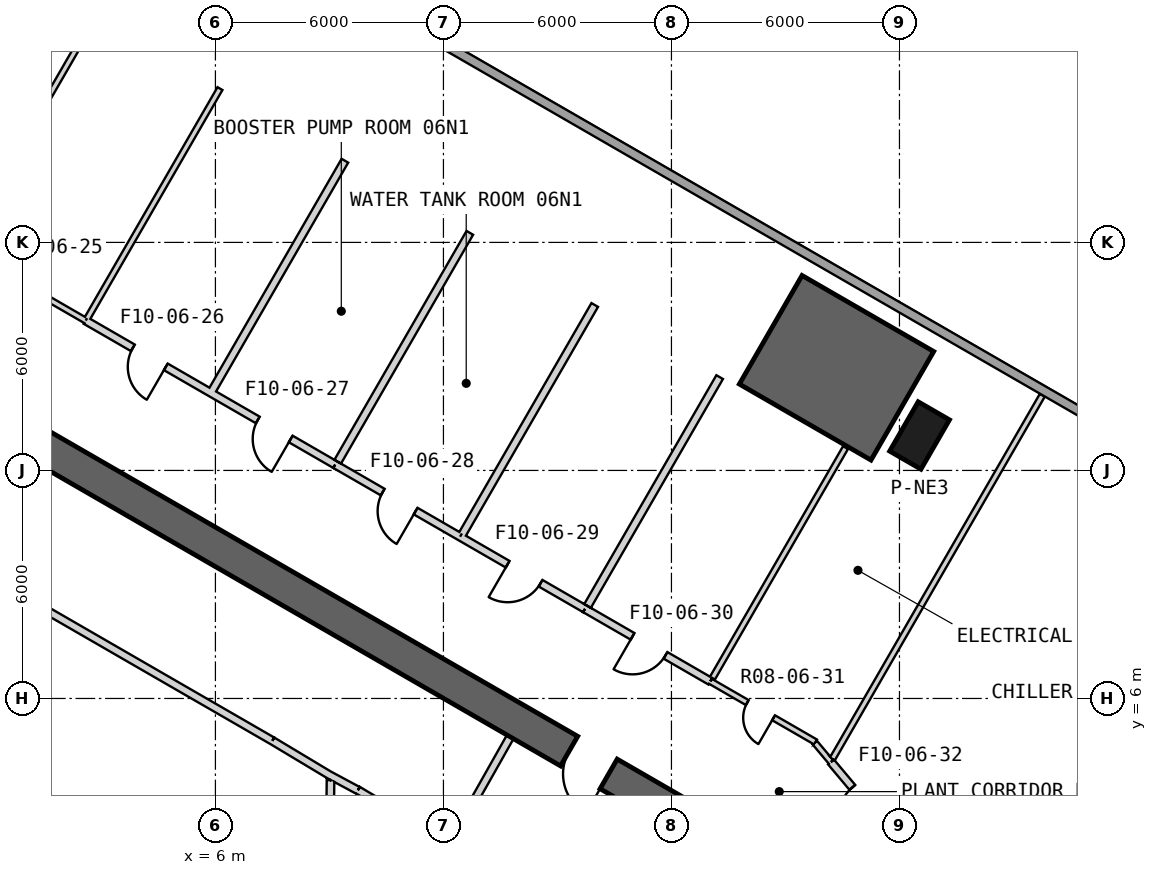
"""IFC4 building model, lengths in metres.
Left out: names, types, materials, properties, quantities, classifications, styles, units other than length and angle.
Written with IfcOpenShell. Run it as: python <this file> out.ifc"""

import sys

from ifc_helpers import new_model, si_unit, direction, frame, frame_2d, origin, origin_2d, place, context, subcontext, project, spatial, polyline, rectangle, outline, extrude, element, fill, save


model = new_model("IFC4")
c1 = context("Model", 3, precision=1e-05, world=origin(), true_north=direction((0.0, 1.0)))
c2 = subcontext(c1, "Body", "Model", "MODEL_VIEW")
j1 = project(units=[si_unit("LENGTHUNIT", "METRE"), si_unit("PLANEANGLEUNIT", "RADIAN")], contexts=[c1])
p1 = place(None, origin())
s1 = spatial("IfcSite", under=j1, at=p1, CompositionType="ELEMENT")
p2 = place(p1, origin())
s2 = spatial("IfcBuilding", under=s1, at=p2, CompositionType="ELEMENT")
p3 = place(p2, frame((0.0, 0.0, 39.5)))
s3 = spatial("IfcBuildingStorey", under=s2, at=p3, CompositionType="ELEMENT", Elevation=39.5)
p4 = place(p3, frame((24.529, 12.92, 0.0), z_axis=(0.0, 0.0, 1.0), x_axis=(0.5, 0.866025403784, 0.0)))
e1 = element("IfcColumn", 1, at=p4, inside=s3, PredefinedType="COLUMN", context=c2, shape_type="SweptSolid", body=[
    extrude(rectangle(XDim=1.5, YDim=0.95, at=origin_2d()), origin(), (0.0, 0.0, 1.0), 5.7),
])
p5 = place(p3, frame((19.475, 2.208, 0.0), z_axis=(0.0, 0.0, 1.0), x_axis=(-0.866028369851, 0.499994862586, 0.0)))
e2 = element("IfcWall", 2, at=p5, inside=s3, PredefinedType="SHEAR", context=c2, shape_type="SweptSolid", body=[
    extrude(rectangle(XDim=31.523, YDim=0.9, at=frame_2d((15.762, 0.0))), origin(), (0.0, 0.0, 1.0), 6.0),
])
p6 = place(p5, frame((3.612, 0.0, 0.0)))
e3 = element("IfcOpeningElement", 3, at=p6, cuts=e2, PredefinedType="OPENING", context=c2, shape_type="SweptSolid", body=[
    extrude(rectangle(XDim=1.2, YDim=2.4, at=frame_2d((0.6, 1.2))), frame((0.0, 0.46, 0.0), z_axis=(0.0, -1.0, 0.0), x_axis=(1.0, 0.0, 0.0)), (0.0, 0.0, 1.0), 0.92),
])
p7 = place(p5, frame((26.712, 0.0, 0.0)))
e4 = element("IfcOpeningElement", 4, at=p7, cuts=e2, PredefinedType="OPENING", context=c2, shape_type="SweptSolid", body=[
    extrude(rectangle(XDim=1.2, YDim=2.4, at=frame_2d((0.6, 1.2))), frame((0.0, 0.46, 0.0), z_axis=(0.0, -1.0, 0.0), x_axis=(1.0, 0.0, 0.0)), (0.0, 0.0, 1.0), 0.92),
])
p8 = place(p3, origin())
e5 = element("IfcWall", 5, at=p8, inside=s3, PredefinedType="SHEAR", context=c2, shape_type="SweptSolid", body=[
    extrude(outline(polyline([(24.901, 15.13), (21.437, 17.13), (19.787, 14.272), (23.251, 12.272), (24.901, 15.13)])), origin(), (0.0, 0.0, 1.0), 5.7),
])
p9 = place(p3, frame((30.969, 12.269, 0.0), z_axis=(0.0, 0.0, 1.0), x_axis=(-0.866060590604, 0.499939049688, 0.0)))
e6 = element("IfcWall", 6, at=p9, inside=s3, PredefinedType="SOLIDWALL", context=c2, shape_type="SweptSolid", body=[
    extrude(rectangle(XDim=41.371, YDim=0.24, at=frame_2d((20.686, 0.0))), origin(), (0.0, 0.0, 1.0), 5.7),
])
p10 = place(p3, frame((7.497, 4.886, 0.0), z_axis=(0.0, 0.0, 1.0), x_axis=(-0.866030989016, 0.499990325971, 0.0)))
e7 = element("IfcWall", 7, at=p10, inside=s3, PredefinedType="PLUMBINGWALL", context=c2, shape_type="SweptSolid", body=[
    extrude(rectangle(XDim=8.1, YDim=0.2, at=frame_2d((4.05, 0.0))), origin(), (0.0, 0.0, 1.0), 5.7),
])
p11 = place(p3, frame((12.11, 2.073, 0.0), z_axis=(0.0, 0.0, 1.0), x_axis=(0.49196600604, 0.870614408852, 0.0)))
e8 = element("IfcWall", 8, at=p11, inside=s3, PredefinedType="PLUMBINGWALL", context=c2, shape_type="SweptSolid", body=[
    extrude(rectangle(XDim=3.35, YDim=0.2, at=frame_2d((1.675, 0.0))), origin(), (0.0, 0.0, 1.0), 5.7),
])
p12 = place(p3, frame((12.073, 2.211, 0.0), z_axis=(0.0, 0.0, 1.0), x_axis=(-0.860438357912, 0.509554542943, 0.0)))
e9 = element("IfcWall", 9, at=p12, inside=s3, PredefinedType="PLUMBINGWALL", context=c2, shape_type="SweptSolid", body=[
    extrude(rectangle(XDim=2.7, YDim=0.2, at=frame_2d((1.35, 0.0))), origin(), (0.0, 0.0, 1.0), 5.7),
])
p13 = place(p3, frame((9.748, 3.583, 0.0), z_axis=(0.0, 0.0, 1.0), x_axis=(-0.880917147855, 0.473270513147, 0.0)))
e10 = element("IfcWall", 10, at=p13, inside=s3, PredefinedType="PLUMBINGWALL", context=c2, shape_type="SweptSolid", body=[
    extrude(rectangle(XDim=0.878, YDim=0.2, at=frame_2d((0.439, 0.0))), origin(), (0.0, 0.0, 1.0), 5.7),
])
p14 = place(p3, frame((9.079, 3.937, 0.0), z_axis=(0.0, 0.0, 1.0), x_axis=(-0.857516281273, 0.51445682749, 0.0)))
e11 = element("IfcWall", 11, at=p14, inside=s3, PredefinedType="PLUMBINGWALL", context=c2, shape_type="SweptSolid", body=[
    extrude(rectangle(XDim=1.845, YDim=0.2, at=frame_2d((0.922, 0.0))), origin(), (0.0, 0.0, 1.0), 5.7),
])
p15 = place(p3, frame((9.001, 1.27, 0.0), z_axis=(0.0, 0.0, 1.0), x_axis=(0.010784614026, 0.999941844359, 0.0)))
e12 = element("IfcWall", 12, at=p15, inside=s3, PredefinedType="PARTITIONING", context=c2, shape_type="SweptSolid", body=[
    extrude(rectangle(XDim=2.581, YDim=0.2, at=frame_2d((1.291, 0.0))), origin(), (0.0, 0.0, 1.0), 5.7),
])
p16 = place(p3, frame((19.023, 6.453, 0.0), z_axis=(0.0, 0.0, 1.0), x_axis=(-0.866009436129, 0.500027655771, 0.0)))
e13 = element("IfcWall", 13, at=p16, inside=s3, PredefinedType="PARTITIONING", context=c2, shape_type="SweptSolid", body=[
    extrude(rectangle(XDim=3.808, YDim=0.2, at=frame_2d((1.904, 0.0))), origin(), (0.0, 0.0, 1.0), 4.88),
])
p17 = place(p16, frame((1.363, 0.0, 0.0)))
e14 = element("IfcOpeningElement", 14, at=p17, cuts=e13, PredefinedType="OPENING", context=c2, shape_type="SweptSolid", body=[
    extrude(rectangle(XDim=1.0, YDim=2.1, at=frame_2d((0.5, 1.05))), frame((0.0, 0.11, 0.0), z_axis=(0.0, -1.0, 0.0), x_axis=(1.0, 0.0, 0.0)), (0.0, 0.0, 1.0), 0.22),
])
p18 = place(p3, frame((15.725, 8.357, 0.0), z_axis=(0.0, 0.0, 1.0), x_axis=(-0.866037770685, 0.499978579288, 0.0)))
e15 = element("IfcWall", 15, at=p18, inside=s3, PredefinedType="PARTITIONING", context=c2, shape_type="SweptSolid", body=[
    extrude(rectangle(XDim=3.796, YDim=0.2, at=frame_2d((1.898, 0.0))), origin(), (0.0, 0.0, 1.0), 4.88),
])
p19 = place(p18, frame((1.35, 0.0, 0.0)))
e16 = element("IfcOpeningElement", 16, at=p19, cuts=e15, PredefinedType="OPENING", context=c2, shape_type="SweptSolid", body=[
    extrude(rectangle(XDim=1.0, YDim=2.1, at=frame_2d((0.5, 1.05))), frame((0.0, 0.11, 0.0), z_axis=(0.0, -1.0, 0.0), x_axis=(1.0, 0.0, 0.0)), (0.0, 0.0, 1.0), 0.22),
])
p20 = place(p3, frame((12.438, 10.255, 0.0), z_axis=(0.0, 0.0, 1.0), x_axis=(-0.866009918585, 0.500026820193, 0.0)))
e17 = element("IfcWall", 17, at=p20, inside=s3, PredefinedType="PARTITIONING", context=c2, shape_type="SweptSolid", body=[
    extrude(rectangle(XDim=3.796, YDim=0.2, at=frame_2d((1.898, 0.0))), origin(), (0.0, 0.0, 1.0), 4.98),
])
p21 = place(p20, frame((1.35, 0.0, 0.0)))
e18 = element("IfcOpeningElement", 18, at=p21, cuts=e17, PredefinedType="OPENING", context=c2, shape_type="SweptSolid", body=[
    extrude(rectangle(XDim=1.0, YDim=2.1, at=frame_2d((0.5, 1.05))), frame((0.0, 0.11, 0.0), z_axis=(0.0, -1.0, 0.0), x_axis=(1.0, 0.0, 0.0)), (0.0, 0.0, 1.0), 0.22),
])
p22 = place(p3, frame((9.15, 12.153, 0.0), z_axis=(0.0, 0.0, 1.0), x_axis=(-0.866026268399, 0.49999850244, 0.0)))
e19 = element("IfcWall", 19, at=p22, inside=s3, PredefinedType="PARTITIONING", context=c2, shape_type="SweptSolid", body=[
    extrude(rectangle(XDim=7.579, YDim=0.2, at=frame_2d((3.79, 0.0))), origin(), (0.0, 0.0, 1.0), 4.98),
])
p23 = place(p22, frame((5.146, 0.0, 0.0)))
e20 = element("IfcOpeningElement", 20, at=p23, cuts=e19, PredefinedType="OPENING", context=c2, shape_type="SweptSolid", body=[
    extrude(rectangle(XDim=1.0, YDim=2.1, at=frame_2d((0.5, 1.05))), frame((0.0, 0.11, 0.0), z_axis=(0.0, -1.0, 0.0), x_axis=(1.0, 0.0, 0.0)), (0.0, 0.0, 1.0), 0.22),
])
p24 = place(p22, frame((1.35, 0.0, 0.0)))
e21 = element("IfcOpeningElement", 21, at=p24, cuts=e19, PredefinedType="OPENING", context=c2, shape_type="SweptSolid", body=[
    extrude(rectangle(XDim=1.0, YDim=2.1, at=frame_2d((0.5, 1.05))), frame((0.0, 0.11, 0.0), z_axis=(0.0, -1.0, 0.0), x_axis=(1.0, 0.0, 0.0)), (0.0, 0.0, 1.0), 0.22),
])
p25 = place(p3, frame((21.792, 4.854, 0.0), z_axis=(0.0, 0.0, 1.0), x_axis=(-0.86603554589, 0.499982432947, 0.0)))
e22 = element("IfcWall", 22, at=p25, inside=s3, PredefinedType="PLUMBINGWALL", context=c2, shape_type="SweptSolid", body=[
    extrude(rectangle(XDim=3.197, YDim=0.15, at=frame_2d((1.599, 0.0))), origin(), (0.0, 0.0, 1.0), 4.88),
])
p26 = place(p25, frame((1.275, 0.0, 0.0)))
e23 = element("IfcOpeningElement", 23, at=p26, cuts=e22, PredefinedType="OPENING", context=c2, shape_type="SweptSolid", body=[
    extrude(rectangle(XDim=0.8, YDim=2.1, at=frame_2d((0.4, 1.05))), frame((0.0, 0.085, 0.0), z_axis=(0.0, -1.0, 0.0), x_axis=(1.0, 0.0, 0.0)), (0.0, 0.0, 1.0), 0.17),
])
p27 = place(p3, frame((2.587, 15.943, 0.0), z_axis=(0.0, 0.0, 1.0), x_axis=(-0.866037770685, 0.499978579288, 0.0)))
e24 = element("IfcWall", 24, at=p27, inside=s3, PredefinedType="PLUMBINGWALL", context=c2, shape_type="SweptSolid", body=[
    extrude(rectangle(XDim=3.796, YDim=0.15, at=frame_2d((1.898, 0.0))), origin(), (0.0, 0.0, 1.0), 4.88),
])
p28 = place(p27, frame((1.363, 0.0, 0.0)))
e25 = element("IfcOpeningElement", 25, at=p28, cuts=e24, PredefinedType="OPENING", context=c2, shape_type="SweptSolid", body=[
    extrude(rectangle(XDim=0.8, YDim=2.1, at=frame_2d((0.4, 1.05))), frame((0.0, 0.085, 0.0), z_axis=(0.0, -1.0, 0.0), x_axis=(1.0, 0.0, 0.0)), (0.0, 0.0, 1.0), 0.17),
])
p29 = place(p3, frame((22.198, 4.33, 0.0), z_axis=(0.0, 0.0, 1.0), x_axis=(-0.642696485047, 0.766120896535, 0.0)))
e26 = element("IfcWall", 26, at=p29, inside=s3, PredefinedType="PLUMBINGWALL", context=c2, shape_type="SweptSolid", body=[
    extrude(rectangle(XDim=0.659, YDim=0.15, at=frame_2d((0.329, 0.0))), origin(), (0.0, 0.0, 1.0), 5.7),
])
p30 = place(p3, frame((24.07, 2.099, 0.0), z_axis=(0.0, 0.0, 1.0), x_axis=(-0.642786909483, 0.766045030659, 0.0)))
e27 = element("IfcWall", 27, at=p30, inside=s3, PredefinedType="PARTITIONING", context=c2, shape_type="SweptSolid", body=[
    extrude(rectangle(XDim=2.912, YDim=0.2, at=frame_2d((1.456, 0.0))), origin(), (0.0, 0.0, 1.0), 4.78),
])
p31 = place(p30, frame((1.037, 0.0, 0.0)))
e28 = element("IfcOpeningElement", 28, at=p31, cuts=e27, PredefinedType="OPENING", context=c2, shape_type="SweptSolid", body=[
    extrude(rectangle(XDim=1.0, YDim=2.1, at=frame_2d((0.5, 1.05))), frame((0.0, 0.11, 0.0), z_axis=(0.0, -1.0, 0.0), x_axis=(1.0, 0.0, 0.0)), (0.0, 0.0, 1.0), 0.22),
])
p32 = place(p3, frame((-0.644, 17.923, 0.0), z_axis=(0.0, 0.0, 1.0), x_axis=(0.500017264306, 0.866015436003, 0.0)))
e29 = element("IfcWall", 29, at=p32, inside=s3, PredefinedType="PLUMBINGWALL", context=c2, shape_type="SweptSolid", body=[
    extrude(rectangle(XDim=6.953, YDim=0.15, at=frame_2d((3.477, 0.0))), origin(), (0.0, 0.0, 1.0), 4.88),
])
p33 = place(p3, frame((2.631, 16.004, 0.0), z_axis=(0.0, 0.0, 1.0), x_axis=(0.500007122158, 0.866021291765, 0.0)))
e30 = element("IfcWall", 30, at=p33, inside=s3, PredefinedType="PLUMBINGWALL", context=c2, shape_type="SweptSolid", body=[
    extrude(rectangle(XDim=6.979, YDim=0.15, at=frame_2d((3.489, 0.0))), origin(), (0.0, 0.0, 1.0), 4.98),
])
p34 = place(p3, frame((9.407, 20.149, 0.0), z_axis=(0.0, 0.0, 1.0), x_axis=(-0.500002060787, -0.866024213985, 0.0)))
e31 = element("IfcWall", 31, at=p34, inside=s3, PredefinedType="PARTITIONING", context=c2, shape_type="SweptSolid", body=[
    extrude(rectangle(XDim=6.954, YDim=0.2, at=frame_2d((3.477, 0.0))), origin(), (0.0, 0.0, 1.0), 5.7),
])
p35 = place(p3, frame((9.218, 12.23, 0.0), z_axis=(0.0, 0.0, 1.0), x_axis=(0.500017264306, 0.866015436003, 0.0)))
e32 = element("IfcWall", 32, at=p35, inside=s3, PredefinedType="PARTITIONING", context=c2, shape_type="SweptSolid", body=[
    extrude(rectangle(XDim=6.953, YDim=0.2, at=frame_2d((3.477, 0.0))), origin(), (0.0, 0.0, 1.0), 5.7),
])
p36 = place(p3, frame((15.981, 16.354, 0.0), z_axis=(0.0, 0.0, 1.0), x_axis=(-0.499990930889, -0.866030639775, 0.0)))
e33 = element("IfcWall", 33, at=p36, inside=s3, PredefinedType="PARTITIONING", context=c2, shape_type="SweptSolid", body=[
    extrude(rectangle(XDim=6.953, YDim=0.2, at=frame_2d((3.477, 0.0))), origin(), (0.0, 0.0, 1.0), 4.98),
])
p37 = place(p3, frame((19.269, 14.456, 0.0), z_axis=(0.0, 0.0, 1.0), x_axis=(-0.500002060787, -0.866024213985, 0.0)))
e34 = element("IfcWall", 34, at=p37, inside=s3, PredefinedType="PARTITIONING", context=c2, shape_type="SweptSolid", body=[
    extrude(rectangle(XDim=6.954, YDim=0.2, at=frame_2d((3.477, 0.0))), origin(), (0.0, 0.0, 1.0), 4.88),
])
p38 = place(p3, frame((22.581, 12.601, 0.0), z_axis=(0.0, 0.0, 1.0), x_axis=(-0.500012147621, -0.866018390239, 0.0)))
e35 = element("IfcWall", 35, at=p38, inside=s3, PredefinedType="PLUMBINGWALL", context=c2, shape_type="SweptSolid", body=[
    extrude(rectangle(XDim=7.003, YDim=0.15, at=frame_2d((3.501, 0.0))), origin(), (0.0, 0.0, 1.0), 4.88),
])
p39 = place(p3, frame((27.759, 13.978, 0.0), z_axis=(0.0, 0.0, 1.0), x_axis=(-0.500006715255, -0.866021526696, 0.0)))
e36 = element("IfcWall", 36, at=p39, inside=s3, PredefinedType="PLUMBINGWALL", context=c2, shape_type="SweptSolid", body=[
    extrude(rectangle(XDim=11.052, YDim=0.15, at=frame_2d((5.526, 0.0))), origin(), (0.0, 0.0, 1.0), 4.88),
])
p40 = place(p23, origin())
e37 = element("IfcDoor", 37, at=p40, inside=s3, OperationType="SINGLE_SWING_LEFT", PredefinedType="USERDEFINED", context=c2, shape_type="SweptSolid", body=[
    extrude(rectangle(XDim=1.0, YDim=2.1, at=frame_2d((0.5, 1.05))), frame((0.0, 0.025, 0.0), z_axis=(0.0, -1.0, 0.0), x_axis=(1.0, 0.0, 0.0)), (0.0, 0.0, 1.0), 0.05),
])
fill(e20, e37)
p41 = place(p24, origin())
e38 = element("IfcDoor", 38, at=p41, inside=s3, OperationType="SINGLE_SWING_LEFT", PredefinedType="USERDEFINED", context=c2, shape_type="SweptSolid", body=[
    extrude(rectangle(XDim=1.0, YDim=2.1, at=frame_2d((0.5, 1.05))), frame((0.0, 0.025, 0.0), z_axis=(0.0, -1.0, 0.0), x_axis=(1.0, 0.0, 0.0)), (0.0, 0.0, 1.0), 0.05),
])
fill(e21, e38)
p42 = place(p21, origin())
e39 = element("IfcDoor", 39, at=p42, inside=s3, OperationType="SINGLE_SWING_LEFT", PredefinedType="USERDEFINED", context=c2, shape_type="SweptSolid", body=[
    extrude(rectangle(XDim=1.0, YDim=2.1, at=frame_2d((0.5, 1.05))), frame((0.0, 0.025, 0.0), z_axis=(0.0, -1.0, 0.0), x_axis=(1.0, 0.0, 0.0)), (0.0, 0.0, 1.0), 0.05),
])
fill(e18, e39)
p43 = place(p19, origin())
e40 = element("IfcDoor", 40, at=p43, inside=s3, OperationType="SINGLE_SWING_RIGHT", PredefinedType="USERDEFINED", context=c2, shape_type="SweptSolid", body=[
    extrude(rectangle(XDim=1.0, YDim=2.1, at=frame_2d((0.5, 1.05))), frame((0.0, 0.025, 0.0), z_axis=(0.0, -1.0, 0.0), x_axis=(1.0, 0.0, 0.0)), (0.0, 0.0, 1.0), 0.05),
])
fill(e16, e40)
p44 = place(p17, origin())
e41 = element("IfcDoor", 41, at=p44, inside=s3, OperationType="SINGLE_SWING_RIGHT", PredefinedType="USERDEFINED", context=c2, shape_type="SweptSolid", body=[
    extrude(rectangle(XDim=1.0, YDim=2.1, at=frame_2d((0.5, 1.05))), frame((0.0, 0.025, 0.0), z_axis=(0.0, -1.0, 0.0), x_axis=(1.0, 0.0, 0.0)), (0.0, 0.0, 1.0), 0.05),
])
fill(e14, e41)
p45 = place(p26, origin())
e42 = element("IfcDoor", 42, at=p45, inside=s3, OperationType="SINGLE_SWING_LEFT", PredefinedType="USERDEFINED", context=c2, shape_type="SweptSolid", body=[
    extrude(rectangle(XDim=0.8, YDim=2.1, at=frame_2d((0.4, 1.05))), frame((0.0, 0.025, 0.0), z_axis=(0.0, -1.0, 0.0), x_axis=(1.0, 0.0, 0.0)), (0.0, 0.0, 1.0), 0.05),
])
fill(e23, e42)
p46 = place(p31, origin())
e43 = element("IfcDoor", 43, at=p46, inside=s3, OperationType="SINGLE_SWING_LEFT", PredefinedType="USERDEFINED", context=c2, shape_type="SweptSolid", body=[
    extrude(rectangle(XDim=1.0, YDim=2.1, at=frame_2d((0.5, 1.05))), frame((0.0, 0.025, 0.0), z_axis=(0.0, -1.0, 0.0), x_axis=(1.0, 0.0, 0.0)), (0.0, 0.0, 1.0), 0.05),
])
fill(e28, e43)
p47 = place(p6, origin())
e44 = element("IfcDoor", 44, at=p47, inside=s3, OperationType="SINGLE_SWING_LEFT", PredefinedType="USERDEFINED", context=c2, shape_type="SweptSolid", body=[
    extrude(rectangle(XDim=1.2, YDim=2.4, at=frame_2d((0.6, 1.2))), frame((0.0, 0.025, 0.0), z_axis=(0.0, -1.0, 0.0), x_axis=(1.0, 0.0, 0.0)), (0.0, 0.0, 1.0), 0.05),
])
fill(e3, e44)
save(model, sys.argv[1])
